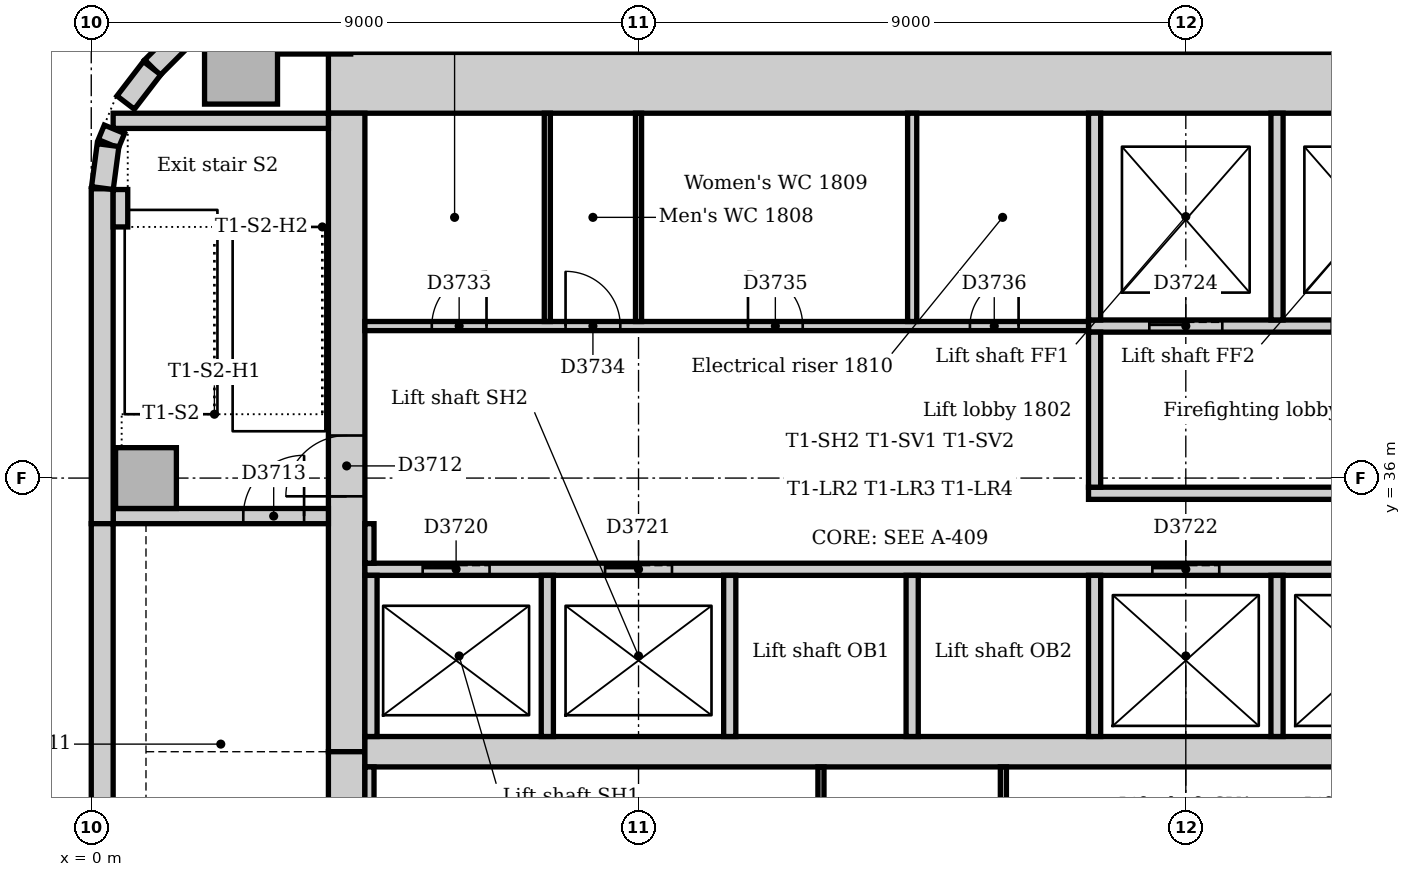
"""IFC4 building model, lengths in metres.
Left out: names, types, materials, properties, quantities, classifications, styles, units other than length and angle.
Written with IfcOpenShell. Run it as: python <this file> out.ifc"""

import sys

from ifc_helpers import new_model, si_unit, direction, frame, frame_2d, origin, origin_2d, place, context, subcontext, project, spatial, rectangle, extrude, element, fill, save


model = new_model("IFC4")
c1 = context("Model", 3, precision=1e-05, world=origin(), true_north=direction((0.0, 1.0)))
c2 = subcontext(c1, "Body", "Model", "MODEL_VIEW")
j1 = project(units=[si_unit("LENGTHUNIT", "METRE"), si_unit("PLANEANGLEUNIT", "RADIAN")], contexts=[c1])
p1 = place(None, origin())
s1 = spatial("IfcSite", under=j1, at=p1, CompositionType="ELEMENT")
p2 = place(p1, origin())
s2 = spatial("IfcBuilding", under=s1, at=p2, CompositionType="ELEMENT")
p3 = place(p2, frame((0.0, 0.0, 79.0)))
s3 = spatial("IfcBuildingStorey", under=s2, at=p3, CompositionType="ELEMENT", Elevation=79.0)
p4 = place(p3, frame((23.5, 42.5, 0.0), z_axis=(0.0, 0.0, 1.0), x_axis=(-1.0, 0.0, 0.0)))
e1 = element("IfcWall", 1, at=p4, inside=s3, PredefinedType="SOLIDWALL", context=c2, shape_type="SweptSolid", body=[
    extrude(rectangle(XDim=19.6, YDim=1.0, at=frame_2d((9.8, 0.0))), origin(), (0.0, 0.0, 1.0), 4.0),
])
p5 = place(p3, frame((4.2, 42.0, 0.0), z_axis=(0.0, 0.0, 1.0), x_axis=(0.0, -1.0, 0.0)))
e2 = element("IfcWall", 2, at=p5, inside=s3, PredefinedType="SOLIDWALL", context=c2, shape_type="SweptSolid", body=[
    extrude(rectangle(XDim=10.5, YDim=0.6, at=frame_2d((5.25, 0.0))), origin(), (0.0, 0.0, 1.0), 4.0),
])
p6 = place(p5, frame((5.3, 0.0, 0.0)))
e3 = element("IfcOpeningElement", 3, at=p6, cuts=e2, PredefinedType="OPENING", context=c2, shape_type="SweptSolid", body=[
    extrude(rectangle(XDim=1.0, YDim=2.1, at=frame_2d((0.5, 1.05))), frame((0.0, 0.31, 0.0), z_axis=(0.0, -1.0, 0.0), x_axis=(1.0, 0.0, 0.0)), (0.0, 0.0, 1.0), 0.62),
])
p7 = place(p3, frame((4.2, 31.5, 0.0), z_axis=(0.0, 0.0, 1.0), x_axis=(0.0, -1.0, 0.0)))
e4 = element("IfcWall", 4, at=p7, inside=s3, PredefinedType="SOLIDWALL", context=c2, shape_type="SweptSolid", body=[
    extrude(rectangle(XDim=10.5, YDim=0.6, at=frame_2d((5.25, 0.0))), origin(), (0.0, 0.0, 1.0), 4.0),
])
p8 = place(p7, frame((4.25, 0.0, 0.0)))
e5 = element("IfcOpeningElement", 5, at=p8, cuts=e4, PredefinedType="OPENING", context=c2, shape_type="SweptSolid", body=[
    extrude(rectangle(XDim=1.0, YDim=2.1, at=frame_2d((0.5, 1.05))), frame((0.0, 0.31, 0.0), z_axis=(0.0, -1.0, 0.0), x_axis=(1.0, 0.0, 0.0)), (0.0, 0.0, 1.0), 0.62),
])
p9 = place(p3, frame((4.5, 31.5, 0.0), z_axis=(0.0, 0.0, 1.0), x_axis=(1.0, 0.0, 0.0)))
e6 = element("IfcWall", 6, at=p9, inside=s3, PredefinedType="SOLIDWALL", context=c2, shape_type="SweptSolid", body=[
    extrude(rectangle(XDim=18.0, YDim=0.5, at=frame_2d((9.0, 0.0))), origin(), (0.0, 0.0, 1.0), 4.0),
])
p10 = place(p3, frame((0.36, 35.375, 0.0), z_axis=(0.0, 0.0, 1.0), x_axis=(1.0, 0.0, 0.0)))
e7 = element("IfcWall", 7, at=p10, inside=s3, PredefinedType="SOLIDWALL", context=c2, shape_type="SweptSolid", body=[
    extrude(rectangle(XDim=3.54, YDim=0.25, at=frame_2d((1.77, 0.0))), origin(), (0.0, 0.0, 1.0), 4.0),
])
p11 = place(p10, frame((2.14, 0.0, 0.0)))
e8 = element("IfcOpeningElement", 8, at=p11, cuts=e7, PredefinedType="OPENING", context=c2, shape_type="SweptSolid", body=[
    extrude(rectangle(XDim=1.0, YDim=2.1, at=frame_2d((0.5, 1.05))), frame((0.0, 0.135, 0.0), z_axis=(0.0, -1.0, 0.0), x_axis=(1.0, 0.0, 0.0)), (0.0, 0.0, 1.0), 0.27),
])
p12 = place(p3, frame((3.9, 41.875, 0.0), z_axis=(0.0, 0.0, 1.0), x_axis=(-1.0, 0.0, 0.0)))
e9 = element("IfcWall", 9, at=p12, inside=s3, PredefinedType="SOLIDWALL", context=c2, shape_type="SweptSolid", body=[
    extrude(rectangle(XDim=3.54, YDim=0.25, at=frame_2d((1.77, 0.0))), origin(), (0.0, 0.0, 1.0), 4.0),
])
for number, where, z_axis, x_axis in (
    (10, (3.667, 43.574, 0.0), (0.0, 0.0, 1.0), (1.0, 0.0, 0.0)),
    (11, (2.463, 42.75, 0.0), (0.0, 0.0, 1.0), (1.0, 0.0, 0.0)),
):
    element("IfcColumn", number, at=place(p3, frame(where, z_axis=z_axis, x_axis=x_axis)), inside=s3, PredefinedType="COLUMN", context=c2, shape_type="SweptSolid", body=[
        extrude(rectangle(XDim=1.2, YDim=1.2, at=origin_2d()), origin(), (0.0, 0.0, 1.0), 3.85),
    ])
p13 = place(p3, frame((0.9, 36.0, 0.0), z_axis=(0.0, 0.0, 1.0), x_axis=(1.0, 0.0, 0.0)))
e12 = element("IfcColumn", 12, at=p13, inside=s3, PredefinedType="COLUMN", context=c2, shape_type="SweptSolid", body=[
    extrude(rectangle(XDim=1.0, YDim=1.0, at=origin_2d()), origin(), (0.0, 0.0, 1.0), 4.0),
])
p14 = place(p3, frame((2.249, 43.994, 0.0), z_axis=(0.0, 0.0, 1.0), x_axis=(-0.707106781187, -0.707106781187, 0.0)))
e13 = element("IfcWall", 13, at=p14, inside=s3, PredefinedType="STANDARD", context=c2, shape_type="SweptSolid", body=[
    extrude(rectangle(XDim=1.757, YDim=0.36, at=frame_2d((0.879, 0.0))), origin(), (0.0, 0.0, 1.0), 3.85),
])
p15 = place(p3, frame((0.18, 40.757, 0.0), z_axis=(0.0, 0.0, 1.0), x_axis=(0.0, -1.0, 0.0)))
e14 = element("IfcWall", 14, at=p15, inside=s3, PredefinedType="STANDARD", context=c2, shape_type="SweptSolid", body=[
    extrude(rectangle(XDim=5.507, YDim=0.36, at=frame_2d((2.754, 0.0))), origin(), (0.0, 0.0, 1.0), 3.85),
])
p16 = place(p3, frame((0.18, 35.25, 0.0), z_axis=(0.0, 0.0, 1.0), x_axis=(0.0, -1.0, 0.0)))
e15 = element("IfcWall", 15, at=p16, inside=s3, PredefinedType="STANDARD", context=c2, shape_type="SweptSolid", body=[
    extrude(rectangle(XDim=7.5, YDim=0.36, at=frame_2d((3.75, 0.0))), origin(), (0.0, 0.0, 1.0), 3.85),
])
p17 = place(p3, frame((1.0, 42.741, 0.0), z_axis=(0.0, 0.0, 1.0), x_axis=(-0.608802368033, -0.793321924995, 0.0)))
e16 = element("IfcWall", 16, at=p17, inside=s3, PredefinedType="STANDARD", context=c2, shape_type="SweptSolid", body=[
    extrude(rectangle(XDim=0.713, YDim=0.36, at=frame_2d((0.357, 0.0))), origin(), (0.0, 0.0, 1.0), 3.85),
])
p18 = place(p3, frame((0.381, 41.736, 0.0), z_axis=(0.0, 0.0, 1.0), x_axis=(-0.382773360986, -0.923842277729, 0.0)))
e17 = element("IfcWall", 17, at=p18, inside=s3, PredefinedType="STANDARD", context=c2, shape_type="SweptSolid", body=[
    extrude(rectangle(XDim=0.258, YDim=0.36, at=frame_2d((0.129, 0.0))), origin(), (0.0, 0.0, 1.0), 3.85),
])
p19 = place(p3, frame((0.276, 41.476, 0.0), z_axis=(0.0, 0.0, 1.0), x_axis=(-0.13055608231, -0.99144092581, 0.0)))
e18 = element("IfcWall", 18, at=p19, inside=s3, PredefinedType="STANDARD", context=c2, shape_type="SweptSolid", body=[
    extrude(rectangle(XDim=0.713, YDim=0.36, at=frame_2d((0.356, 0.0))), origin(), (0.0, 0.0, 1.0), 3.85),
])
p20 = place(p3, frame((0.48, 40.13, 0.0), z_axis=(0.0, 0.0, 1.0), x_axis=(0.0, 1.0, 0.0)))
e19 = element("IfcWall", 19, at=p20, inside=s3, PredefinedType="STANDARD", context=c2, shape_type="SweptSolid", body=[
    extrude(rectangle(XDim=0.615, YDim=0.24, at=frame_2d((0.307, 0.0))), origin(), (0.0, 0.0, 1.0), 4.0),
])
p21 = place(p3, frame((16.4, 35.75, 0.0), z_axis=(0.0, 0.0, 1.0), x_axis=(1.0, 0.0, 0.0)))
e20 = element("IfcWall", 20, at=p21, inside=s3, PredefinedType="PARTITIONING", context=c2, shape_type="SweptSolid", body=[
    extrude(rectangle(XDim=6.1, YDim=0.2, at=frame_2d((3.05, 0.0))), origin(), (0.0, 0.0, 1.0), 3.85),
])
p22 = place(p3, frame((16.4, 38.5, 0.0), z_axis=(0.0, 0.0, 1.0), x_axis=(1.0, 0.0, 0.0)))
e21 = element("IfcWall", 21, at=p22, inside=s3, PredefinedType="PARTITIONING", context=c2, shape_type="SweptSolid", body=[
    extrude(rectangle(XDim=6.1, YDim=0.2, at=frame_2d((3.05, 0.0))), origin(), (0.0, 0.0, 1.0), 3.85),
])
p23 = place(p22, frame((1.0, 0.0, 0.0)))
e22 = element("IfcOpeningElement", 22, at=p23, cuts=e21, PredefinedType="OPENING", context=c2, shape_type="SweptSolid", body=[
    extrude(rectangle(XDim=1.2, YDim=2.1, at=frame_2d((0.6, 1.05))), frame((0.0, 0.11, 0.0), z_axis=(0.0, -1.0, 0.0), x_axis=(1.0, 0.0, 0.0)), (0.0, 0.0, 1.0), 0.22),
])
p24 = place(p22, frame((4.0, 0.0, 0.0)))
e23 = element("IfcOpeningElement", 23, at=p24, cuts=e21, PredefinedType="OPENING", context=c2, shape_type="SweptSolid", body=[
    extrude(rectangle(XDim=1.2, YDim=2.1, at=frame_2d((0.6, 1.05))), frame((0.0, 0.11, 0.0), z_axis=(0.0, -1.0, 0.0), x_axis=(1.0, 0.0, 0.0)), (0.0, 0.0, 1.0), 0.22),
])
p25 = place(p3, frame((16.5, 35.85, 0.0), z_axis=(0.0, 0.0, 1.0), x_axis=(0.0, 1.0, 0.0)))
e24 = element("IfcWall", 24, at=p25, inside=s3, PredefinedType="PARTITIONING", context=c2, shape_type="SweptSolid", body=[
    extrude(rectangle(XDim=2.55, YDim=0.2, at=frame_2d((1.275, 0.0))), origin(), (0.0, 0.0, 1.0), 3.85),
])
p26 = place(p3, frame((4.5, 34.5, 0.0), z_axis=(0.0, 0.0, 1.0), x_axis=(1.0, 0.0, 0.0)))
e25 = element("IfcWall", 25, at=p26, inside=s3, PredefinedType="PARTITIONING", context=c2, shape_type="SweptSolid", body=[
    extrude(rectangle(XDim=18.0, YDim=0.2, at=frame_2d((9.0, 0.0))), origin(), (0.0, 0.0, 1.0), 3.85),
])
p27 = place(p26, frame((0.95, 0.0, 0.0)))
e26 = element("IfcOpeningElement", 26, at=p27, cuts=e25, PredefinedType="OPENING", context=c2, shape_type="SweptSolid", body=[
    extrude(rectangle(XDim=1.1, YDim=2.1, at=frame_2d((0.55, 1.05))), frame((0.0, 0.11, 0.0), z_axis=(0.0, -1.0, 0.0), x_axis=(1.0, 0.0, 0.0)), (0.0, 0.0, 1.0), 0.22),
])
p28 = place(p26, frame((3.95, 0.0, 0.0)))
e27 = element("IfcOpeningElement", 27, at=p28, cuts=e25, PredefinedType="OPENING", context=c2, shape_type="SweptSolid", body=[
    extrude(rectangle(XDim=1.1, YDim=2.1, at=frame_2d((0.55, 1.05))), frame((0.0, 0.11, 0.0), z_axis=(0.0, -1.0, 0.0), x_axis=(1.0, 0.0, 0.0)), (0.0, 0.0, 1.0), 0.22),
])
p29 = place(p26, frame((12.95, 0.0, 0.0)))
e28 = element("IfcOpeningElement", 28, at=p29, cuts=e25, PredefinedType="OPENING", context=c2, shape_type="SweptSolid", body=[
    extrude(rectangle(XDim=1.1, YDim=2.1, at=frame_2d((0.55, 1.05))), frame((0.0, 0.11, 0.0), z_axis=(0.0, -1.0, 0.0), x_axis=(1.0, 0.0, 0.0)), (0.0, 0.0, 1.0), 0.22),
])
p30 = place(p26, frame((15.95, 0.0, 0.0)))
e29 = element("IfcOpeningElement", 29, at=p30, cuts=e25, PredefinedType="OPENING", context=c2, shape_type="SweptSolid", body=[
    extrude(rectangle(XDim=1.1, YDim=2.1, at=frame_2d((0.55, 1.05))), frame((0.0, 0.11, 0.0), z_axis=(0.0, -1.0, 0.0), x_axis=(1.0, 0.0, 0.0)), (0.0, 0.0, 1.0), 0.22),
])
for number, where, z_axis, x_axis in (
    (30, (16.5, 38.6, 0.0), (0.0, 0.0, 1.0), (0.0, 1.0, 0.0)),
    (31, (19.5, 38.6, 0.0), (0.0, 0.0, 1.0), (0.0, 1.0, 0.0)),
):
    element("IfcWall", number, at=place(p3, frame(where, z_axis=z_axis, x_axis=x_axis)), inside=s3, PredefinedType="PARTITIONING", context=c2, shape_type="SweptSolid", body=[
        extrude(rectangle(XDim=3.4, YDim=0.2, at=frame_2d((1.7, 0.0))), origin(), (0.0, 0.0, 1.0), 3.85),
    ])
for number, where, z_axis, x_axis in (
    (32, (4.6, 31.75, 0.0), (0.0, 0.0, 1.0), (0.0, 1.0, 0.0)),
    (33, (7.5, 31.75, 0.0), (0.0, 0.0, 1.0), (0.0, 1.0, 0.0)),
    (34, (10.5, 31.75, 0.0), (0.0, 0.0, 1.0), (0.0, 1.0, 0.0)),
    (35, (13.5, 31.75, 0.0), (0.0, 0.0, 1.0), (0.0, 1.0, 0.0)),
    (36, (16.5, 31.75, 0.0), (0.0, 0.0, 1.0), (0.0, 1.0, 0.0)),
    (37, (19.5, 31.75, 0.0), (0.0, 0.0, 1.0), (0.0, 1.0, 0.0)),
):
    element("IfcWall", number, at=place(p3, frame(where, z_axis=z_axis, x_axis=x_axis)), inside=s3, PredefinedType="PARTITIONING", context=c2, shape_type="SweptSolid", body=[
        extrude(rectangle(XDim=2.65, YDim=0.2, at=frame_2d((1.325, 0.0))), origin(), (0.0, 0.0, 1.0), 3.85),
    ])
p31 = place(p3, frame((4.5, 38.5, 0.0), z_axis=(0.0, 0.0, 1.0), x_axis=(1.0, 0.0, 0.0)))
e38 = element("IfcWall", 38, at=p31, inside=s3, PredefinedType="PARTITIONING", context=c2, shape_type="SweptSolid", body=[
    extrude(rectangle(XDim=11.9, YDim=0.15, at=frame_2d((5.95, 0.0))), origin(), (0.0, 0.0, 1.0), 3.85),
])
p32 = place(p31, frame((1.1, 0.0, 0.0)))
e39 = element("IfcOpeningElement", 39, at=p32, cuts=e38, PredefinedType="OPENING", context=c2, shape_type="SweptSolid", body=[
    extrude(rectangle(XDim=0.9, YDim=2.1, at=frame_2d((0.45, 1.05))), frame((0.0, 0.085, 0.0), z_axis=(0.0, -1.0, 0.0), x_axis=(1.0, 0.0, 0.0)), (0.0, 0.0, 1.0), 0.17),
])
p33 = place(p31, frame((3.3, 0.0, 0.0)))
e40 = element("IfcOpeningElement", 40, at=p33, cuts=e38, PredefinedType="OPENING", context=c2, shape_type="SweptSolid", body=[
    extrude(rectangle(XDim=0.9, YDim=2.1, at=frame_2d((0.45, 1.05))), frame((0.0, 0.085, 0.0), z_axis=(0.0, -1.0, 0.0), x_axis=(1.0, 0.0, 0.0)), (0.0, 0.0, 1.0), 0.17),
])
p34 = place(p31, frame((6.3, 0.0, 0.0)))
e41 = element("IfcOpeningElement", 41, at=p34, cuts=e38, PredefinedType="OPENING", context=c2, shape_type="SweptSolid", body=[
    extrude(rectangle(XDim=0.9, YDim=2.1, at=frame_2d((0.45, 1.05))), frame((0.0, 0.085, 0.0), z_axis=(0.0, -1.0, 0.0), x_axis=(1.0, 0.0, 0.0)), (0.0, 0.0, 1.0), 0.17),
])
p35 = place(p31, frame((9.95, 0.0, 0.0)))
e42 = element("IfcOpeningElement", 42, at=p35, cuts=e38, PredefinedType="OPENING", context=c2, shape_type="SweptSolid", body=[
    extrude(rectangle(XDim=0.8, YDim=2.1, at=frame_2d((0.4, 1.05))), frame((0.0, 0.085, 0.0), z_axis=(0.0, -1.0, 0.0), x_axis=(1.0, 0.0, 0.0)), (0.0, 0.0, 1.0), 0.17),
])
p36 = place(p3, frame((4.575, 28.575, 0.0), z_axis=(0.0, 0.0, 1.0), x_axis=(0.0, 1.0, 0.0)))
e43 = element("IfcWall", 43, at=p36, inside=s3, PredefinedType="PARTITIONING", context=c2, shape_type="SweptSolid", body=[
    extrude(rectangle(XDim=2.675, YDim=0.15, at=frame_2d((1.337, 0.0))), origin(), (0.0, 0.0, 1.0), 3.85),
])
p37 = place(p3, frame((4.575, 34.6, 0.0), z_axis=(0.0, 0.0, 1.0), x_axis=(0.0, 1.0, 0.0)))
e44 = element("IfcWall", 44, at=p37, inside=s3, PredefinedType="PARTITIONING", context=c2, shape_type="SweptSolid", body=[
    extrude(rectangle(XDim=0.65, YDim=0.15, at=frame_2d((0.325, 0.0))), origin(), (0.0, 0.0, 1.0), 3.85),
])
p38 = place(p3, frame((13.5, 38.575, 0.0), z_axis=(0.0, 0.0, 1.0), x_axis=(0.0, 1.0, 0.0)))
e45 = element("IfcWall", 45, at=p38, inside=s3, PredefinedType="PARTITIONING", context=c2, shape_type="SweptSolid", body=[
    extrude(rectangle(XDim=3.425, YDim=0.15, at=frame_2d((1.712, 0.0))), origin(), (0.0, 0.0, 1.0), 3.85),
])
for number, where, z_axis, x_axis in (
    (46, (7.5, 38.575, 0.0), (0.0, 0.0, 1.0), (0.0, 1.0, 0.0)),
    (47, (9.0, 38.575, 0.0), (0.0, 0.0, 1.0), (0.0, 1.0, 0.0)),
):
    element("IfcWall", number, at=place(p3, frame(where, z_axis=z_axis, x_axis=x_axis)), inside=s3, PredefinedType="PARTITIONING", context=c2, shape_type="SweptSolid", body=[
        extrude(rectangle(XDim=3.425, YDim=0.1, at=frame_2d((1.712, 0.0))), origin(), (0.0, 0.0, 1.0), 3.85),
    ])
for number, where, z_axis, x_axis in (
    (48, (12.0, 28.575, 0.0), (0.0, 0.0, 1.0), (0.0, 1.0, 0.0)),
    (49, (15.0, 28.575, 0.0), (0.0, 0.0, 1.0), (0.0, 1.0, 0.0)),
):
    element("IfcWall", number, at=place(p3, frame(where, z_axis=z_axis, x_axis=x_axis)), inside=s3, PredefinedType="PARTITIONING", context=c2, shape_type="SweptSolid", body=[
        extrude(rectangle(XDim=2.675, YDim=0.1, at=frame_2d((1.337, 0.0))), origin(), (0.0, 0.0, 1.0), 3.85),
    ])
p39 = place(p6, frame((1.0, 0.0, 0.0), z_axis=(0.0, 0.0, 1.0), x_axis=(-1.0, 0.0, 0.0)))
e50 = element("IfcDoor", 50, at=p39, inside=s3, OperationType="SINGLE_SWING_LEFT", PredefinedType="DOOR", context=c2, shape_type="SweptSolid", body=[
    extrude(rectangle(XDim=1.0, YDim=2.1, at=frame_2d((0.5, 1.05))), frame((0.0, 0.025, 0.0), z_axis=(0.0, -1.0, 0.0), x_axis=(1.0, 0.0, 0.0)), (0.0, 0.0, 1.0), 0.05),
])
fill(e3, e50)
p40 = place(p11, origin())
e51 = element("IfcDoor", 51, at=p40, inside=s3, OperationType="SINGLE_SWING_RIGHT", PredefinedType="DOOR", context=c2, shape_type="SweptSolid", body=[
    extrude(rectangle(XDim=1.0, YDim=2.1, at=frame_2d((0.5, 1.05))), frame((0.0, 0.025, 0.0), z_axis=(0.0, -1.0, 0.0), x_axis=(1.0, 0.0, 0.0)), (0.0, 0.0, 1.0), 0.05),
])
fill(e8, e51)
p41 = place(p27, origin())
e52 = element("IfcDoor", 52, at=p41, inside=s3, OperationType="SLIDING_TO_LEFT", PredefinedType="DOOR", context=c2, shape_type="SweptSolid", body=[
    extrude(rectangle(XDim=1.1, YDim=2.1, at=frame_2d((0.55, 1.05))), frame((0.0, 0.025, 0.0), z_axis=(0.0, -1.0, 0.0), x_axis=(1.0, 0.0, 0.0)), (0.0, 0.0, 1.0), 0.05),
])
fill(e26, e52)
p42 = place(p28, origin())
e53 = element("IfcDoor", 53, at=p42, inside=s3, OperationType="SLIDING_TO_LEFT", PredefinedType="DOOR", context=c2, shape_type="SweptSolid", body=[
    extrude(rectangle(XDim=1.1, YDim=2.1, at=frame_2d((0.55, 1.05))), frame((0.0, 0.025, 0.0), z_axis=(0.0, -1.0, 0.0), x_axis=(1.0, 0.0, 0.0)), (0.0, 0.0, 1.0), 0.05),
])
fill(e27, e53)
p43 = place(p29, origin())
e54 = element("IfcDoor", 54, at=p43, inside=s3, OperationType="SLIDING_TO_LEFT", PredefinedType="DOOR", context=c2, shape_type="SweptSolid", body=[
    extrude(rectangle(XDim=1.1, YDim=2.1, at=frame_2d((0.55, 1.05))), frame((0.0, 0.025, 0.0), z_axis=(0.0, -1.0, 0.0), x_axis=(1.0, 0.0, 0.0)), (0.0, 0.0, 1.0), 0.05),
])
fill(e28, e54)
p44 = place(p23, origin())
e55 = element("IfcDoor", 55, at=p44, inside=s3, OperationType="SLIDING_TO_LEFT", PredefinedType="DOOR", context=c2, shape_type="SweptSolid", body=[
    extrude(rectangle(XDim=1.2, YDim=2.1, at=frame_2d((0.6, 1.05))), frame((0.0, 0.025, 0.0), z_axis=(0.0, -1.0, 0.0), x_axis=(1.0, 0.0, 0.0)), (0.0, 0.0, 1.0), 0.05),
])
fill(e22, e55)
p45 = place(p32, origin())
e56 = element("IfcDoor", 56, at=p45, inside=s3, OperationType="SINGLE_SWING_RIGHT", PredefinedType="DOOR", context=c2, shape_type="SweptSolid", body=[
    extrude(rectangle(XDim=0.9, YDim=2.1, at=frame_2d((0.45, 1.05))), frame((0.0, 0.025, 0.0), z_axis=(0.0, -1.0, 0.0), x_axis=(1.0, 0.0, 0.0)), (0.0, 0.0, 1.0), 0.05),
])
fill(e39, e56)
p46 = place(p33, origin())
e57 = element("IfcDoor", 57, at=p46, inside=s3, OperationType="SINGLE_SWING_LEFT", PredefinedType="DOOR", context=c2, shape_type="SweptSolid", body=[
    extrude(rectangle(XDim=0.9, YDim=2.1, at=frame_2d((0.45, 1.05))), frame((0.0, 0.025, 0.0), z_axis=(0.0, -1.0, 0.0), x_axis=(1.0, 0.0, 0.0)), (0.0, 0.0, 1.0), 0.05),
])
fill(e40, e57)
p47 = place(p34, origin())
e58 = element("IfcDoor", 58, at=p47, inside=s3, OperationType="SINGLE_SWING_LEFT", PredefinedType="DOOR", context=c2, shape_type="SweptSolid", body=[
    extrude(rectangle(XDim=0.9, YDim=2.1, at=frame_2d((0.45, 1.05))), frame((0.0, 0.025, 0.0), z_axis=(0.0, -1.0, 0.0), x_axis=(1.0, 0.0, 0.0)), (0.0, 0.0, 1.0), 0.05),
])
fill(e41, e58)
p48 = place(p35, origin())
e59 = element("IfcDoor", 59, at=p48, inside=s3, OperationType="SINGLE_SWING_RIGHT", PredefinedType="DOOR", context=c2, shape_type="SweptSolid", body=[
    extrude(rectangle(XDim=0.8, YDim=2.1, at=frame_2d((0.4, 1.05))), frame((0.0, 0.025, 0.0), z_axis=(0.0, -1.0, 0.0), x_axis=(1.0, 0.0, 0.0)), (0.0, 0.0, 1.0), 0.05),
])
fill(e42, e59)
save(model, sys.argv[1])
